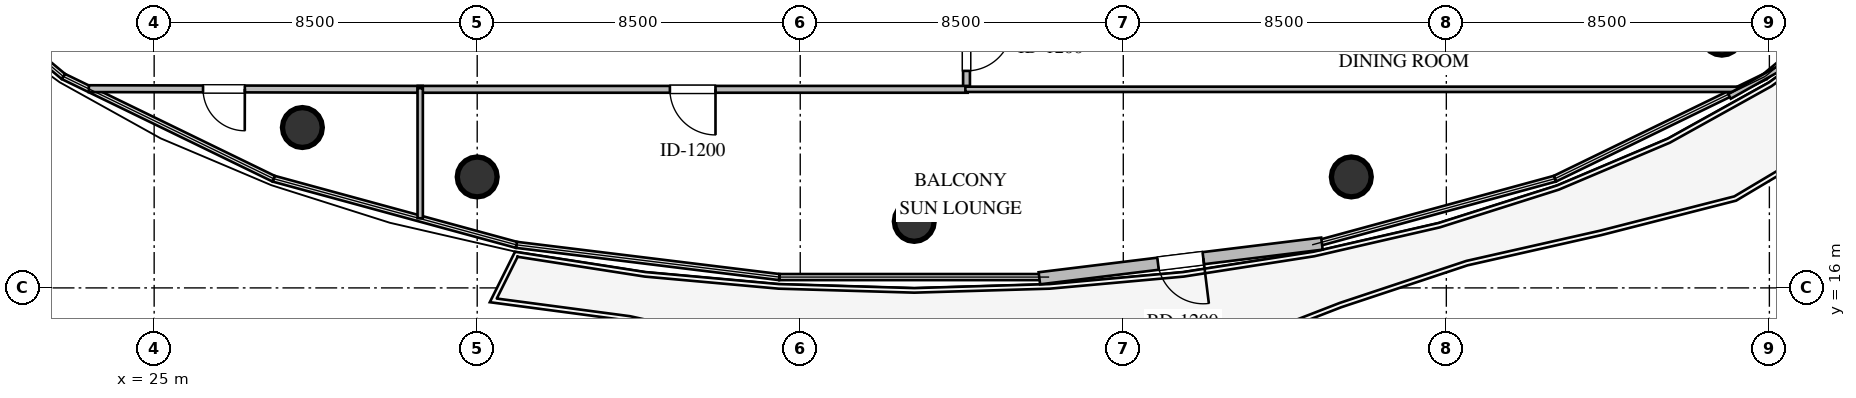
"""IFC4 building model, lengths in metres.
Left out: names, types, materials, properties, quantities, classifications, styles, units other than length and angle.
Written with IfcOpenShell. Run it as: python <this file> out.ifc"""

import sys

from ifc_helpers import new_model, si_unit, direction, frame, frame_2d, origin, origin_2d, place, context, subcontext, project, spatial, rectangle, circle, extrude, element, fill, save


model = new_model("IFC4")
c1 = context("Model", 3, precision=1e-05, world=origin(), true_north=direction((0.0, 1.0)))
c2 = subcontext(c1, "Body", "Model", "MODEL_VIEW")
j1 = project(units=[si_unit("LENGTHUNIT", "METRE"), si_unit("PLANEANGLEUNIT", "RADIAN")], contexts=[c1])
p1 = place(None, origin())
s1 = spatial("IfcSite", under=j1, at=p1, CompositionType="ELEMENT")
p2 = place(p1, origin())
s2 = spatial("IfcBuilding", under=s1, at=p2, CompositionType="ELEMENT")
p3 = place(p2, frame((0.0, 0.0, 202.8)))
s3 = spatial("IfcBuildingStorey", under=s2, at=p3, CompositionType="ELEMENT", Elevation=202.8)
for number, where, z_axis, x_axis in (
    (1, (28.9, 20.22, 0.0), (0.0, 0.0, 1.0), (1.0, 0.0, 0.0)),
    (2, (33.5, 18.92, 0.0), (0.0, 0.0, 1.0), (1.0, 0.0, 0.0)),
    (3, (45.0, 17.75, 0.0), (0.0, 0.0, 1.0), (1.0, 0.0, 0.0)),
    (4, (56.5, 18.92, 0.0), (0.0, 0.0, 1.0), (1.0, 0.0, 0.0)),
    (5, (66.25, 22.65, 0.0), (0.0, 0.0, 1.0), (1.0, 0.0, 0.0)),
):
    element("IfcColumn", number, at=place(p3, frame(where, z_axis=z_axis, x_axis=x_axis)), inside=s3, PredefinedType="COLUMN", context=c2, shape_type="SweptSolid", body=[
        extrude(circle(Radius=0.525, at=origin_2d()), origin(), (0.0, 0.0, 1.0), 3.6),
    ])
p4 = place(p3, frame((55.727, 17.165, 0.0), z_axis=(0.0, 0.0, 1.0), x_axis=(-0.992559081031, -0.121763995755, 0.0)))
e6 = element("IfcWall", 6, at=p4, inside=s3, PredefinedType="STANDARD", context=c2, shape_type="SweptSolid", body=[
    extrude(rectangle(XDim=7.491, YDim=0.32, at=frame_2d((3.745, 0.0))), origin(), (0.0, 0.0, 1.0), 3.36),
])
p5 = place(p4, frame((3.145, 0.0, 0.0)))
e7 = element("IfcOpeningElement", 7, at=p5, cuts=e6, PredefinedType="OPENING", context=c2, shape_type="SweptSolid", body=[
    extrude(rectangle(XDim=1.2, YDim=2.15, at=frame_2d((0.6, 1.075))), frame((0.0, 0.17, 0.0), z_axis=(0.0, -1.0, 0.0), x_axis=(1.0, 0.0, 0.0)), (0.0, 0.0, 1.0), 0.34),
])
p6 = place(p3, frame((46.375, 23.425, 0.0), z_axis=(0.0, 0.0, 1.0), x_axis=(0.0, -1.0, 0.0)))
e8 = element("IfcWall", 8, at=p6, inside=s3, PredefinedType="PARTITIONING", context=c2, shape_type="SweptSolid", body=[
    extrude(rectangle(XDim=2.23, YDim=0.18, at=frame_2d((1.115, 0.0))), origin(), (0.0, 0.0, 1.0), 3.36),
])
p7 = place(p6, frame((0.515, 0.0, 0.0)))
e9 = element("IfcOpeningElement", 9, at=p7, cuts=e8, PredefinedType="OPENING", context=c2, shape_type="SweptSolid", body=[
    extrude(rectangle(XDim=1.2, YDim=2.15, at=frame_2d((0.6, 1.075))), frame((0.0, 0.1, 0.0), z_axis=(0.0, -1.0, 0.0), x_axis=(1.0, 0.0, 0.0)), (0.0, 0.0, 1.0), 0.2),
])
p8 = place(p3, frame((32.065, 21.225, 0.0), z_axis=(0.0, 0.0, 1.0), x_axis=(-0.999998107366, 0.001945575683, 0.0)))
e10 = element("IfcWall", 10, at=p8, inside=s3, PredefinedType="PARTITIONING", context=c2, shape_type="SweptSolid", body=[
    extrude(rectangle(XDim=8.784, YDim=0.18, at=frame_2d((4.392, 0.0))), origin(), (0.0, 0.0, 1.0), 2.89),
])
p9 = place(p8, frame((4.679, 0.0, 0.0)))
e11 = element("IfcOpeningElement", 11, at=p9, cuts=e10, PredefinedType="OPENING", context=c2, shape_type="SweptSolid", body=[
    extrude(rectangle(XDim=1.1, YDim=2.1, at=frame_2d((0.55, 1.05))), frame((0.0, 0.1, 0.0), z_axis=(0.0, -1.0, 0.0), x_axis=(1.0, 0.0, 0.0)), (0.0, 0.0, 1.0), 0.2),
])
p10 = place(p3, frame((46.405, 21.225, 0.0), z_axis=(0.0, 0.0, 1.0), x_axis=(-1.0, 0.0, 0.0)))
e12 = element("IfcWall", 12, at=p10, inside=s3, PredefinedType="PARTITIONING", context=c2, shape_type="SweptSolid", body=[
    extrude(rectangle(XDim=14.47, YDim=0.18, at=frame_2d((7.235, 0.0))), origin(), (0.0, 0.0, 1.0), 2.996),
])
p11 = place(p10, frame((6.635, 0.0, 0.0)))
e13 = element("IfcOpeningElement", 13, at=p11, cuts=e12, PredefinedType="OPENING", context=c2, shape_type="SweptSolid", body=[
    extrude(rectangle(XDim=1.2, YDim=2.15, at=frame_2d((0.6, 1.075))), frame((0.0, 0.1, 0.0), z_axis=(0.0, -1.0, 0.0), x_axis=(1.0, 0.0, 0.0)), (0.0, 0.0, 1.0), 0.2),
])
p12 = place(p3, frame((66.684, 21.225, 0.0), z_axis=(0.0, 0.0, 1.0), x_axis=(-1.0, 0.0, 0.0)))
e14 = element("IfcWall", 14, at=p12, inside=s3, PredefinedType="PARTITIONING", context=c2, shape_type="SweptSolid", body=[
    extrude(rectangle(XDim=20.339, YDim=0.14, at=frame_2d((10.169, 0.0))), origin(), (0.0, 0.0, 1.0), 2.996),
])
p13 = place(p3, frame((67.748, 21.77, 0.0), z_axis=(0.0, 0.0, 1.0), x_axis=(-0.871352238731, -0.490658003153, 0.0)))
e15 = element("IfcWall", 15, at=p13, inside=s3, PredefinedType="PARTITIONING", context=c2, shape_type="SweptSolid", body=[
    extrude(rectangle(XDim=1.49, YDim=0.14, at=frame_2d((0.745, 0.0))), origin(), (0.0, 0.0, 1.0), 3.36),
])
p14 = place(p3, frame((32.0, 21.255, 0.0), z_axis=(0.0, 0.0, 1.0), x_axis=(0.0, -1.0, 0.0)))
e16 = element("IfcWall", 16, at=p14, inside=s3, PredefinedType="PARTITIONING", context=c2, shape_type="SweptSolid", body=[
    extrude(rectangle(XDim=3.422, YDim=0.14, at=frame_2d((1.711, 0.0))), origin(), (0.0, 0.0, 1.0), 3.36),
])
p15 = place(p5, origin())
e17 = element("IfcDoor", 17, at=p15, inside=s3, OperationType="SINGLE_SWING_LEFT", PredefinedType="DOOR", context=c2, shape_type="SweptSolid", body=[
    extrude(rectangle(XDim=1.2, YDim=2.15, at=frame_2d((0.6, 1.075))), frame((0.0, 0.025, 0.0), z_axis=(0.0, -1.0, 0.0), x_axis=(1.0, 0.0, 0.0)), (0.0, 0.0, 1.0), 0.05),
])
fill(e7, e17)
p16 = place(p7, origin())
e18 = element("IfcDoor", 18, at=p16, inside=s3, OperationType="SINGLE_SWING_LEFT", PredefinedType="DOOR", context=c2, shape_type="SweptSolid", body=[
    extrude(rectangle(XDim=1.2, YDim=2.15, at=frame_2d((0.6, 1.075))), frame((0.0, 0.025, 0.0), z_axis=(0.0, -1.0, 0.0), x_axis=(1.0, 0.0, 0.0)), (0.0, 0.0, 1.0), 0.05),
])
fill(e9, e18)
p17 = place(p9, origin())
e19 = element("IfcDoor", 19, at=p17, inside=s3, OperationType="SINGLE_SWING_LEFT", PredefinedType="DOOR", context=c2, shape_type="SweptSolid", body=[
    extrude(rectangle(XDim=1.1, YDim=2.1, at=frame_2d((0.55, 1.05))), frame((0.0, 0.025, 0.0), z_axis=(0.0, -1.0, 0.0), x_axis=(1.0, 0.0, 0.0)), (0.0, 0.0, 1.0), 0.05),
])
fill(e11, e19)
p18 = place(p11, origin())
e20 = element("IfcDoor", 20, at=p18, inside=s3, OperationType="SINGLE_SWING_LEFT", PredefinedType="DOOR", context=c2, shape_type="SweptSolid", body=[
    extrude(rectangle(XDim=1.2, YDim=2.15, at=frame_2d((0.6, 1.075))), frame((0.0, 0.025, 0.0), z_axis=(0.0, -1.0, 0.0), x_axis=(1.0, 0.0, 0.0)), (0.0, 0.0, 1.0), 0.05),
])
fill(e13, e20)
save(model, sys.argv[1])
